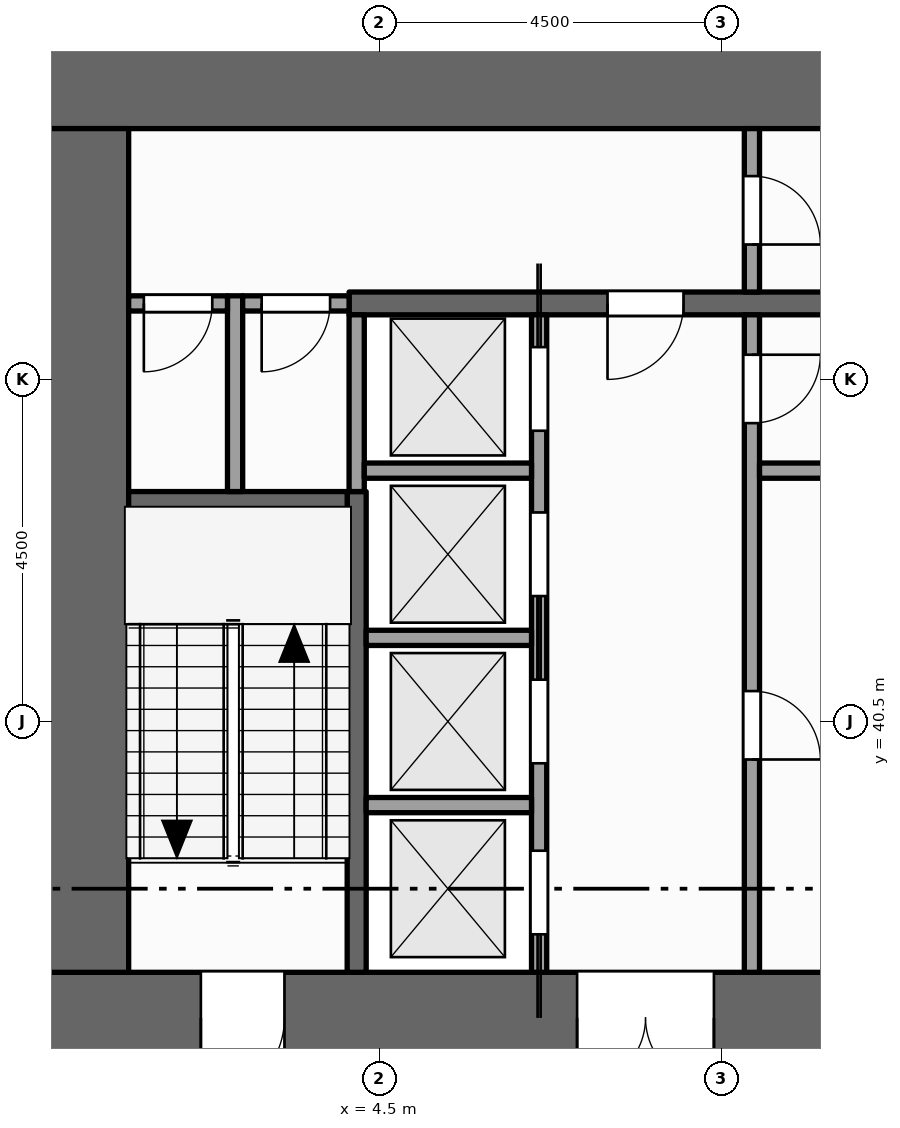
"""IFC4 building model, lengths in metres.
Left out: names, types, materials, properties, quantities, classifications, styles, units other than length and angle.
Written with IfcOpenShell. Run it as: python <this file> out.ifc"""

import sys

from ifc_helpers import new_model, si_unit, direction, frame, frame_2d, origin, place, context, subcontext, project, spatial, rectangle, extrude, element, fill, save


model = new_model("IFC4")
c1 = context("Model", 3, precision=1e-05, world=origin(), true_north=direction((0.0, 1.0)))
c2 = subcontext(c1, "Body", "Model", "MODEL_VIEW")
j1 = project(units=[si_unit("LENGTHUNIT", "METRE"), si_unit("PLANEANGLEUNIT", "RADIAN")], contexts=[c1])
p1 = place(None, origin())
s1 = spatial("IfcSite", under=j1, at=p1, CompositionType="ELEMENT")
p2 = place(p1, origin())
s2 = spatial("IfcBuilding", under=s1, at=p2, CompositionType="ELEMENT")
p3 = place(p2, frame((0.0, 0.0, 69.0)))
s3 = spatial("IfcBuildingStorey", under=s2, at=p3, CompositionType="ELEMENT", Elevation=69.0)
p4 = place(p3, frame((0.0, 36.6, -0.15), z_axis=(0.0, 0.0, 1.0), x_axis=(1.0, 0.0, 0.0)))
e1 = element("IfcWall", 1, at=p4, inside=s3, PredefinedType="SHEAR", context=c2, shape_type="SweptSolid", body=[
    extrude(rectangle(XDim=22.5, YDim=1.2, at=frame_2d((11.25, 0.0))), origin(), (0.0, 0.0, 1.0), 4.0),
])
p5 = place(p4, frame((7.1, 0.0, 0.15)))
e2 = element("IfcOpeningElement", 2, at=p5, cuts=e1, PredefinedType="OPENING", context=c2, shape_type="SweptSolid", body=[
    extrude(rectangle(XDim=1.8, YDim=2.1, at=frame_2d((0.9, 1.05))), frame((0.0, 0.61, 0.0), z_axis=(0.0, -1.0, 0.0), x_axis=(1.0, 0.0, 0.0)), (0.0, 0.0, 1.0), 1.22),
])
p6 = place(p4, frame((13.15, 0.0, 0.15)))
e3 = element("IfcOpeningElement", 3, at=p6, cuts=e1, PredefinedType="OPENING", context=c2, shape_type="SweptSolid", body=[
    extrude(rectangle(XDim=1.1, YDim=2.1, at=frame_2d((0.55, 1.05))), frame((0.0, 0.61, 0.0), z_axis=(0.0, -1.0, 0.0), x_axis=(1.0, 0.0, 0.0)), (0.0, 0.0, 1.0), 1.22),
])
p7 = place(p4, frame((2.15, 0.0, 0.15)))
e4 = element("IfcOpeningElement", 4, at=p7, cuts=e1, PredefinedType="OPENING", context=c2, shape_type="SweptSolid", body=[
    extrude(rectangle(XDim=1.1, YDim=2.1, at=frame_2d((0.55, 1.05))), frame((0.0, 0.61, 0.0), z_axis=(0.0, -1.0, 0.0), x_axis=(1.0, 0.0, 0.0)), (0.0, 0.0, 1.0), 1.22),
])
p8 = place(p4, frame((19.35, 0.0, 0.15)))
e5 = element("IfcOpeningElement", 5, at=p8, cuts=e1, PredefinedType="OPENING", context=c2, shape_type="SweptSolid", body=[
    extrude(rectangle(XDim=1.1, YDim=2.1, at=frame_2d((0.55, 1.05))), frame((0.0, 0.61, 0.0), z_axis=(0.0, -1.0, 0.0), x_axis=(1.0, 0.0, 0.0)), (0.0, 0.0, 1.0), 1.22),
])
p9 = place(p3, frame((0.0, 48.9, -0.15), z_axis=(0.0, 0.0, 1.0), x_axis=(1.0, 0.0, 0.0)))
e6 = element("IfcWall", 6, at=p9, inside=s3, PredefinedType="SHEAR", context=c2, shape_type="SweptSolid", body=[
    extrude(rectangle(XDim=22.5, YDim=1.2, at=frame_2d((11.25, 0.0))), origin(), (0.0, 0.0, 1.0), 4.0),
])
p10 = place(p3, frame((0.6, 37.2, -0.15), z_axis=(0.0, 0.0, 1.0), x_axis=(0.0, 1.0, 0.0)))
e7 = element("IfcWall", 7, at=p10, inside=s3, PredefinedType="SHEAR", context=c2, shape_type="SweptSolid", body=[
    extrude(rectangle(XDim=11.1, YDim=1.2, at=frame_2d((5.55, 0.0))), origin(), (0.0, 0.0, 1.0), 4.0),
])
p11 = place(p3, frame((2.6, 43.525, 0.0), z_axis=(0.0, 0.0, 1.0), x_axis=(0.0, 1.0, 0.0)))
e8 = element("IfcWall", 8, at=p11, inside=s3, PredefinedType="PARTITIONING", context=c2, shape_type="SweptSolid", body=[
    extrude(rectangle(XDim=2.575, YDim=0.2, at=frame_2d((1.288, 0.0))), origin(), (0.0, 0.0, 1.0), 3.85),
])
p12 = place(p3, frame((4.2, 37.2, 0.0), z_axis=(0.0, 0.0, 1.0), x_axis=(0.0, 1.0, 0.0)))
e9 = element("IfcWall", 9, at=p12, inside=s3, PredefinedType="SHEAR", context=c2, shape_type="SweptSolid", body=[
    extrude(rectangle(XDim=6.325, YDim=0.25, at=frame_2d((3.163, 0.0))), origin(), (0.0, 0.0, 1.0), 3.85),
])
p13 = place(p3, frame((4.2, 43.525, 0.0), z_axis=(0.0, 0.0, 1.0), x_axis=(0.0, 1.0, 0.0)))
e10 = element("IfcWall", 10, at=p13, inside=s3, PredefinedType="SOLIDWALL", context=c2, shape_type="SweptSolid", body=[
    extrude(rectangle(XDim=2.325, YDim=0.2, at=frame_2d((1.163, 0.0))), origin(), (0.0, 0.0, 1.0), 3.85),
])
p14 = place(p3, frame((6.6, 37.2, 0.0), z_axis=(0.0, 0.0, 1.0), x_axis=(0.0, 1.0, 0.0)))
e11 = element("IfcWall", 11, at=p14, inside=s3, PredefinedType="SOLIDWALL", context=c2, shape_type="SweptSolid", body=[
    extrude(rectangle(XDim=8.65, YDim=0.2, at=frame_2d((4.325, 0.0))), origin(), (0.0, 0.0, 1.0), 3.85),
])
p15 = place(p14, frame((0.5, 0.0, 0.012)))
e12 = element("IfcOpeningElement", 12, at=p15, cuts=e11, PredefinedType="OPENING", context=c2, shape_type="SweptSolid", body=[
    extrude(rectangle(XDim=1.1, YDim=2.1, at=frame_2d((0.55, 1.05))), frame((0.0, 0.11, 0.0), z_axis=(0.0, -1.0, 0.0), x_axis=(1.0, 0.0, 0.0)), (0.0, 0.0, 1.0), 0.22),
])
p16 = place(p14, frame((2.75, 0.0, 0.012)))
e13 = element("IfcOpeningElement", 13, at=p16, cuts=e11, PredefinedType="OPENING", context=c2, shape_type="SweptSolid", body=[
    extrude(rectangle(XDim=1.1, YDim=2.1, at=frame_2d((0.55, 1.05))), frame((0.0, 0.11, 0.0), z_axis=(0.0, -1.0, 0.0), x_axis=(1.0, 0.0, 0.0)), (0.0, 0.0, 1.0), 0.22),
])
p17 = place(p14, frame((4.95, 0.0, 0.012)))
e14 = element("IfcOpeningElement", 14, at=p17, cuts=e11, PredefinedType="OPENING", context=c2, shape_type="SweptSolid", body=[
    extrude(rectangle(XDim=1.1, YDim=2.1, at=frame_2d((0.55, 1.05))), frame((0.0, 0.11, 0.0), z_axis=(0.0, -1.0, 0.0), x_axis=(1.0, 0.0, 0.0)), (0.0, 0.0, 1.0), 0.22),
])
p18 = place(p14, frame((7.125, 0.0, 0.012)))
e15 = element("IfcOpeningElement", 15, at=p18, cuts=e11, PredefinedType="OPENING", context=c2, shape_type="SweptSolid", body=[
    extrude(rectangle(XDim=1.1, YDim=2.1, at=frame_2d((0.55, 1.05))), frame((0.0, 0.11, 0.0), z_axis=(0.0, -1.0, 0.0), x_axis=(1.0, 0.0, 0.0)), (0.0, 0.0, 1.0), 0.22),
])
p19 = place(p3, frame((9.4, 37.2, 0.0), z_axis=(0.0, 0.0, 1.0), x_axis=(0.0, 1.0, 0.0)))
e16 = element("IfcWall", 16, at=p19, inside=s3, PredefinedType="PARTITIONING", context=c2, shape_type="SweptSolid", body=[
    extrude(rectangle(XDim=8.65, YDim=0.2, at=frame_2d((4.325, 0.0))), origin(), (0.0, 0.0, 1.0), 3.85),
])
p20 = place(p19, frame((2.8, 0.0, 0.0)))
e17 = element("IfcOpeningElement", 17, at=p20, cuts=e16, PredefinedType="OPENING", context=c2, shape_type="SweptSolid", body=[
    extrude(rectangle(XDim=0.9, YDim=2.1, at=frame_2d((0.45, 1.05))), frame((0.0, 0.11, 0.0), z_axis=(0.0, -1.0, 0.0), x_axis=(1.0, 0.0, 0.0)), (0.0, 0.0, 1.0), 0.22),
])
p21 = place(p19, frame((7.225, 0.0, 0.0)))
e18 = element("IfcOpeningElement", 18, at=p21, cuts=e16, PredefinedType="OPENING", context=c2, shape_type="SweptSolid", body=[
    extrude(rectangle(XDim=0.9, YDim=2.1, at=frame_2d((0.45, 1.05))), frame((0.0, 0.11, 0.0), z_axis=(0.0, -1.0, 0.0), x_axis=(1.0, 0.0, 0.0)), (0.0, 0.0, 1.0), 0.22),
])
p22 = place(p3, frame((9.4, 46.15, 0.0), z_axis=(0.0, 0.0, 1.0), x_axis=(0.0, 1.0, 0.0)))
e19 = element("IfcWall", 19, at=p22, inside=s3, PredefinedType="PARTITIONING", context=c2, shape_type="SweptSolid", body=[
    extrude(rectangle(XDim=2.15, YDim=0.2, at=frame_2d((1.075, 0.0))), origin(), (0.0, 0.0, 1.0), 3.85),
])
p23 = place(p22, frame((0.625, 0.0, 0.0)))
e20 = element("IfcOpeningElement", 20, at=p23, cuts=e19, PredefinedType="OPENING", context=c2, shape_type="SweptSolid", body=[
    extrude(rectangle(XDim=0.9, YDim=2.1, at=frame_2d((0.45, 1.05))), frame((0.0, 0.11, 0.0), z_axis=(0.0, -1.0, 0.0), x_axis=(1.0, 0.0, 0.0)), (0.0, 0.0, 1.0), 0.22),
])
for number, where, z_axis, x_axis in (
    (21, (4.325, 39.4, 0.0), (0.0, 0.0, 1.0), (1.0, 0.0, 0.0)),
    (22, (4.325, 41.6, 0.0), (0.0, 0.0, 1.0), (1.0, 0.0, 0.0)),
):
    element("IfcWall", number, at=place(p3, frame(where, z_axis=z_axis, x_axis=x_axis)), inside=s3, PredefinedType="SOLIDWALL", context=c2, shape_type="SweptSolid", body=[
        extrude(rectangle(XDim=2.175, YDim=0.2, at=frame_2d((1.087, 0.0))), origin(), (0.0, 0.0, 1.0), 3.85),
    ])
p24 = place(p3, frame((1.2, 43.4, 0.0), z_axis=(0.0, 0.0, 1.0), x_axis=(1.0, 0.0, 0.0)))
e23 = element("IfcWall", 23, at=p24, inside=s3, PredefinedType="SHEAR", context=c2, shape_type="SweptSolid", body=[
    extrude(rectangle(XDim=2.875, YDim=0.25, at=frame_2d((1.438, 0.0))), origin(), (0.0, 0.0, 1.0), 3.85),
])
p25 = place(p3, frame((4.3, 43.8, 0.0), z_axis=(0.0, 0.0, 1.0), x_axis=(1.0, 0.0, 0.0)))
e24 = element("IfcWall", 24, at=p25, inside=s3, PredefinedType="SOLIDWALL", context=c2, shape_type="SweptSolid", body=[
    extrude(rectangle(XDim=2.2, YDim=0.2, at=frame_2d((1.1, 0.0))), origin(), (0.0, 0.0, 1.0), 3.85),
])
p26 = place(p3, frame((9.5, 43.8, 0.0), z_axis=(0.0, 0.0, 1.0), x_axis=(1.0, 0.0, 0.0)))
e25 = element("IfcWall", 25, at=p26, inside=s3, PredefinedType="PARTITIONING", context=c2, shape_type="SweptSolid", body=[
    extrude(rectangle(XDim=2.2, YDim=0.2, at=frame_2d((1.1, 0.0))), origin(), (0.0, 0.0, 1.0), 3.85),
])
p27 = place(p3, frame((1.2, 46.0, 0.0), z_axis=(0.0, 0.0, 1.0), x_axis=(1.0, 0.0, 0.0)))
e26 = element("IfcWall", 26, at=p27, inside=s3, PredefinedType="PARTITIONING", context=c2, shape_type="SweptSolid", body=[
    extrude(rectangle(XDim=1.3, YDim=0.2, at=frame_2d((0.65, 0.0))), origin(), (0.0, 0.0, 1.0), 3.85),
])
p28 = place(p27, frame((0.2, 0.0, 0.0)))
e27 = element("IfcOpeningElement", 27, at=p28, cuts=e26, PredefinedType="OPENING", context=c2, shape_type="SweptSolid", body=[
    extrude(rectangle(XDim=0.9, YDim=2.1, at=frame_2d((0.45, 1.05))), frame((0.0, 0.11, 0.0), z_axis=(0.0, -1.0, 0.0), x_axis=(1.0, 0.0, 0.0)), (0.0, 0.0, 1.0), 0.22),
])
p29 = place(p3, frame((2.7, 46.0, 0.0), z_axis=(0.0, 0.0, 1.0), x_axis=(1.0, 0.0, 0.0)))
e28 = element("IfcWall", 28, at=p29, inside=s3, PredefinedType="PARTITIONING", context=c2, shape_type="SweptSolid", body=[
    extrude(rectangle(XDim=1.4, YDim=0.2, at=frame_2d((0.7, 0.0))), origin(), (0.0, 0.0, 1.0), 3.85),
])
p30 = place(p29, frame((0.25, 0.0, 0.0)))
e29 = element("IfcOpeningElement", 29, at=p30, cuts=e28, PredefinedType="OPENING", context=c2, shape_type="SweptSolid", body=[
    extrude(rectangle(XDim=0.9, YDim=2.1, at=frame_2d((0.45, 1.05))), frame((0.0, 0.11, 0.0), z_axis=(0.0, -1.0, 0.0), x_axis=(1.0, 0.0, 0.0)), (0.0, 0.0, 1.0), 0.22),
])
p31 = place(p3, frame((4.1, 46.0, 0.0), z_axis=(0.0, 0.0, 1.0), x_axis=(1.0, 0.0, 0.0)))
e30 = element("IfcWall", 30, at=p31, inside=s3, PredefinedType="SHEAR", context=c2, shape_type="SweptSolid", body=[
    extrude(rectangle(XDim=14.5, YDim=0.3, at=frame_2d((7.25, 0.0))), origin(), (0.0, 0.0, 1.0), 3.85),
])
p32 = place(p31, frame((3.4, 0.0, 0.0)))
e31 = element("IfcOpeningElement", 31, at=p32, cuts=e30, PredefinedType="OPENING", context=c2, shape_type="SweptSolid", body=[
    extrude(rectangle(XDim=1.0, YDim=2.1, at=frame_2d((0.5, 1.05))), frame((0.0, 0.16, 0.0), z_axis=(0.0, -1.0, 0.0), x_axis=(1.0, 0.0, 0.0)), (0.0, 0.0, 1.0), 0.32),
])
p33 = place(p31, frame((9.1, 0.0, 0.0)))
e32 = element("IfcOpeningElement", 32, at=p33, cuts=e30, PredefinedType="OPENING", context=c2, shape_type="SweptSolid", body=[
    extrude(rectangle(XDim=1.0, YDim=2.1, at=frame_2d((0.5, 1.05))), frame((0.0, 0.16, 0.0), z_axis=(0.0, -1.0, 0.0), x_axis=(1.0, 0.0, 0.0)), (0.0, 0.0, 1.0), 0.32),
])
p34 = place(p15, origin())
e33 = element("IfcDoor", 33, at=p34, inside=s3, OperationType="SLIDING_TO_LEFT", PredefinedType="DOOR", context=c2, shape_type="SweptSolid", body=[
    extrude(rectangle(XDim=1.1, YDim=2.1, at=frame_2d((0.55, 1.05))), frame((0.0, 0.025, 0.0), z_axis=(0.0, -1.0, 0.0), x_axis=(1.0, 0.0, 0.0)), (0.0, 0.0, 1.0), 0.05),
])
fill(e12, e33)
p35 = place(p16, origin())
e34 = element("IfcDoor", 34, at=p35, inside=s3, OperationType="SLIDING_TO_RIGHT", PredefinedType="DOOR", context=c2, shape_type="SweptSolid", body=[
    extrude(rectangle(XDim=1.1, YDim=2.1, at=frame_2d((0.55, 1.05))), frame((0.0, 0.025, 0.0), z_axis=(0.0, -1.0, 0.0), x_axis=(1.0, 0.0, 0.0)), (0.0, 0.0, 1.0), 0.05),
])
fill(e13, e34)
p36 = place(p17, origin())
e35 = element("IfcDoor", 35, at=p36, inside=s3, OperationType="SLIDING_TO_LEFT", PredefinedType="DOOR", context=c2, shape_type="SweptSolid", body=[
    extrude(rectangle(XDim=1.1, YDim=2.1, at=frame_2d((0.55, 1.05))), frame((0.0, 0.025, 0.0), z_axis=(0.0, -1.0, 0.0), x_axis=(1.0, 0.0, 0.0)), (0.0, 0.0, 1.0), 0.05),
])
fill(e14, e35)
p37 = place(p18, origin())
e36 = element("IfcDoor", 36, at=p37, inside=s3, OperationType="SLIDING_TO_RIGHT", PredefinedType="DOOR", context=c2, shape_type="SweptSolid", body=[
    extrude(rectangle(XDim=1.1, YDim=2.1, at=frame_2d((0.55, 1.05))), frame((0.0, 0.025, 0.0), z_axis=(0.0, -1.0, 0.0), x_axis=(1.0, 0.0, 0.0)), (0.0, 0.0, 1.0), 0.05),
])
fill(e15, e36)
p38 = place(p5, origin())
e37 = element("IfcDoor", 37, at=p38, inside=s3, OperationType="DOUBLE_DOOR_SINGLE_SWING", PredefinedType="DOOR", context=c2, shape_type="SweptSolid", body=[
    extrude(rectangle(XDim=1.8, YDim=2.1, at=frame_2d((0.9, 1.05))), frame((0.0, 0.025, 0.0), z_axis=(0.0, -1.0, 0.0), x_axis=(1.0, 0.0, 0.0)), (0.0, 0.0, 1.0), 0.05),
])
fill(e2, e37)
p39 = place(p32, origin())
e38 = element("IfcDoor", 38, at=p39, inside=s3, OperationType="SINGLE_SWING_LEFT", PredefinedType="DOOR", context=c2, shape_type="SweptSolid", body=[
    extrude(rectangle(XDim=1.0, YDim=2.1, at=frame_2d((0.5, 1.05))), frame((0.0, 0.025, 0.0), z_axis=(0.0, -1.0, 0.0), x_axis=(1.0, 0.0, 0.0)), (0.0, 0.0, 1.0), 0.05),
])
fill(e31, e38)
p40 = place(p23, origin())
e39 = element("IfcDoor", 39, at=p40, inside=s3, OperationType="SINGLE_SWING_LEFT", PredefinedType="DOOR", context=c2, shape_type="SweptSolid", body=[
    extrude(rectangle(XDim=0.9, YDim=2.1, at=frame_2d((0.45, 1.05))), frame((0.0, 0.025, 0.0), z_axis=(0.0, -1.0, 0.0), x_axis=(1.0, 0.0, 0.0)), (0.0, 0.0, 1.0), 0.05),
])
fill(e20, e39)
p41 = place(p7, origin())
e40 = element("IfcDoor", 40, at=p41, inside=s3, OperationType="SINGLE_SWING_LEFT", PredefinedType="DOOR", context=c2, shape_type="SweptSolid", body=[
    extrude(rectangle(XDim=1.1, YDim=2.1, at=frame_2d((0.55, 1.05))), frame((0.0, 0.025, 0.0), z_axis=(0.0, -1.0, 0.0), x_axis=(1.0, 0.0, 0.0)), (0.0, 0.0, 1.0), 0.05),
])
fill(e4, e40)
p42 = place(p28, origin())
e41 = element("IfcDoor", 41, at=p42, inside=s3, OperationType="SINGLE_SWING_LEFT", PredefinedType="DOOR", context=c2, shape_type="SweptSolid", body=[
    extrude(rectangle(XDim=0.9, YDim=2.1, at=frame_2d((0.45, 1.05))), frame((0.0, 0.025, 0.0), z_axis=(0.0, -1.0, 0.0), x_axis=(1.0, 0.0, 0.0)), (0.0, 0.0, 1.0), 0.05),
])
fill(e27, e41)
p43 = place(p30, origin())
e42 = element("IfcDoor", 42, at=p43, inside=s3, OperationType="SINGLE_SWING_LEFT", PredefinedType="DOOR", context=c2, shape_type="SweptSolid", body=[
    extrude(rectangle(XDim=0.9, YDim=2.1, at=frame_2d((0.45, 1.05))), frame((0.0, 0.025, 0.0), z_axis=(0.0, -1.0, 0.0), x_axis=(1.0, 0.0, 0.0)), (0.0, 0.0, 1.0), 0.05),
])
fill(e29, e42)
p44 = place(p20, origin())
e43 = element("IfcDoor", 43, at=p44, inside=s3, OperationType="SINGLE_SWING_LEFT", PredefinedType="DOOR", context=c2, shape_type="SweptSolid", body=[
    extrude(rectangle(XDim=0.9, YDim=2.1, at=frame_2d((0.45, 1.05))), frame((0.0, 0.025, 0.0), z_axis=(0.0, -1.0, 0.0), x_axis=(1.0, 0.0, 0.0)), (0.0, 0.0, 1.0), 0.05),
])
fill(e17, e43)
p45 = place(p21, origin())
e44 = element("IfcDoor", 44, at=p45, inside=s3, OperationType="SINGLE_SWING_RIGHT", PredefinedType="DOOR", context=c2, shape_type="SweptSolid", body=[
    extrude(rectangle(XDim=0.9, YDim=2.1, at=frame_2d((0.45, 1.05))), frame((0.0, 0.025, 0.0), z_axis=(0.0, -1.0, 0.0), x_axis=(1.0, 0.0, 0.0)), (0.0, 0.0, 1.0), 0.05),
])
fill(e18, e44)
save(model, sys.argv[1])
